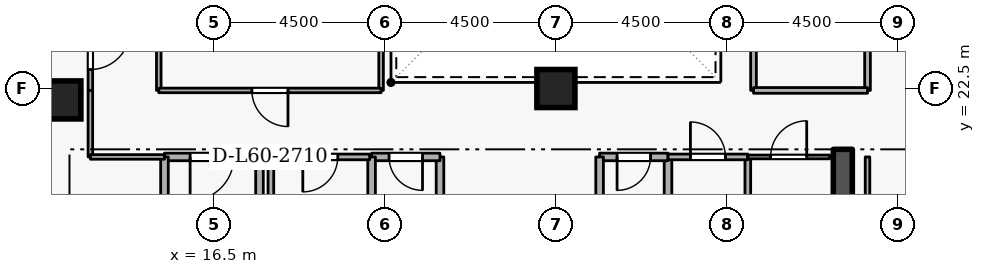
"""IFC4 building model, lengths in metres.
Left out: names, types, materials, properties, quantities, classifications, styles, units other than length and angle.
Written with IfcOpenShell. Run it as: python <this file> out.ifc"""

import sys

from ifc_helpers import new_model, si_unit, direction, frame, frame_2d, origin, origin_2d, place, context, subcontext, project, spatial, rectangle, extrude, element, fill, save


model = new_model("IFC4")
c1 = context("Model", 3, precision=1e-05, world=origin(), true_north=direction((0.0, 1.0)))
c2 = subcontext(c1, "Body", "Model", "MODEL_VIEW")
j1 = project(units=[si_unit("LENGTHUNIT", "METRE"), si_unit("PLANEANGLEUNIT", "RADIAN")], contexts=[c1])
p1 = place(None, origin())
s1 = spatial("IfcSite", under=j1, at=p1, CompositionType="ELEMENT")
p2 = place(p1, origin())
s2 = spatial("IfcBuilding", under=s1, at=p2, CompositionType="ELEMENT")
p3 = place(p2, frame((0.0, 0.0, 225.9)))
s3 = spatial("IfcBuildingStorey", under=s2, at=p3, CompositionType="ELEMENT", Elevation=225.9)
p4 = place(p3, frame((33.05, 15.1, 0.0), z_axis=(0.0, 0.0, 1.0), x_axis=(0.0, 1.0, 0.0)))
e1 = element("IfcWall", 1, at=p4, inside=s3, PredefinedType="SHEAR", context=c2, shape_type="SweptSolid", body=[
    extrude(rectangle(XDim=5.8, YDim=0.5, at=frame_2d((2.9, 0.0))), origin(), (0.0, 0.0, 1.0), 3.6),
])
for number, where, z_axis, x_axis in (
    (2, (12.5, 22.2, 0.0), (0.0, 0.0, 1.0), (1.0, 0.0, 0.0)),
    (3, (25.5, 22.5, 0.0), (0.0, 0.0, 1.0), (1.0, 0.0, 0.0)),
):
    element("IfcColumn", number, at=place(p3, frame(where, z_axis=z_axis, x_axis=x_axis)), inside=s3, PredefinedType="COLUMN", context=c2, shape_type="SweptSolid", body=[
        extrude(rectangle(XDim=1.0, YDim=1.0, at=origin_2d()), origin(), (0.0, 0.0, 1.0), 3.6),
    ])
p5 = place(p3, frame((17.7, 18.4, 0.0), z_axis=(0.0, 0.0, 1.0), x_axis=(0.0, 1.0, 0.0)))
e4 = element("IfcWall", 4, at=p5, inside=s3, PredefinedType="STANDARD", context=c2, shape_type="SweptSolid", body=[
    extrude(rectangle(XDim=2.3, YDim=0.2, at=frame_2d((1.15, 0.0))), origin(), (0.0, 0.0, 1.0), 2.505),
])
p6 = place(p3, frame((17.7, 20.7, 0.0), z_axis=(0.0, 0.0, 1.0), x_axis=(-1.0, 0.0, 0.0)))
e5 = element("IfcWall", 5, at=p6, inside=s3, PredefinedType="STANDARD", context=c2, shape_type="SweptSolid", body=[
    extrude(rectangle(XDim=2.5, YDim=0.2, at=frame_2d((1.25, 0.0))), origin(), (0.0, 0.0, 1.0), 3.3),
])
p7 = place(p6, frame((0.675, 0.0, 0.0)))
e6 = element("IfcOpeningElement", 6, at=p7, cuts=e5, PredefinedType="OPENING", context=c2, shape_type="SweptSolid", body=[
    extrude(rectangle(XDim=1.15, YDim=2.1, at=frame_2d((0.575, 1.05))), frame((0.0, 0.11, 0.0), z_axis=(0.0, -1.0, 0.0), x_axis=(1.0, 0.0, 0.0)), (0.0, 0.0, 1.0), 0.22),
])
p8 = place(p3, frame((15.2, 20.7, 0.0), z_axis=(0.0, 0.0, 1.0), x_axis=(0.0, -1.0, 0.0)))
e7 = element("IfcWall", 7, at=p8, inside=s3, PredefinedType="STANDARD", context=c2, shape_type="SweptSolid", body=[
    extrude(rectangle(XDim=5.7, YDim=0.2, at=frame_2d((2.85, 0.0))), origin(), (0.0, 0.0, 1.0), 3.3),
])
p9 = place(p3, frame((28.45, 18.65, 0.0), z_axis=(0.0, 0.0, 1.0), x_axis=(0.0, 1.0, 0.0)))
e8 = element("IfcWall", 8, at=p9, inside=s3, PredefinedType="STANDARD", context=c2, shape_type="SweptSolid", body=[
    extrude(rectangle(XDim=2.05, YDim=0.2, at=frame_2d((1.025, 0.0))), origin(), (0.0, 0.0, 1.0), 3.3),
])
p10 = place(p3, frame((28.45, 20.7, 0.0), z_axis=(0.0, 0.0, 1.0), x_axis=(-1.0, 0.0, 0.0)))
e9 = element("IfcWall", 9, at=p10, inside=s3, PredefinedType="STANDARD", context=c2, shape_type="SweptSolid", body=[
    extrude(rectangle(XDim=1.8, YDim=0.2, at=frame_2d((0.9, 0.0))), origin(), (0.0, 0.0, 1.0), 3.3),
])
p11 = place(p10, frame((0.46, 0.0, 0.0)))
e10 = element("IfcOpeningElement", 10, at=p11, cuts=e9, PredefinedType="OPENING", context=c2, shape_type="SweptSolid", body=[
    extrude(rectangle(XDim=0.88, YDim=2.04, at=frame_2d((0.44, 1.02))), frame((0.0, 0.11, 0.0), z_axis=(0.0, -1.0, 0.0), x_axis=(1.0, 0.0, 0.0)), (0.0, 0.0, 1.0), 0.22),
])
for number, where, z_axis, x_axis in (
    (11, (26.65, 20.7, 0.0), (0.0, 0.0, 1.0), (0.0, -1.0, 0.0)),
    (12, (22.45, 18.65, 0.0), (0.0, 0.0, 1.0), (0.0, 1.0, 0.0)),
):
    element("IfcWall", number, at=place(p3, frame(where, z_axis=z_axis, x_axis=x_axis)), inside=s3, PredefinedType="STANDARD", context=c2, shape_type="SweptSolid", body=[
        extrude(rectangle(XDim=2.05, YDim=0.2, at=frame_2d((1.025, 0.0))), origin(), (0.0, 0.0, 1.0), 3.3),
    ])
p12 = place(p3, frame((22.45, 20.7, 0.0), z_axis=(0.0, 0.0, 1.0), x_axis=(-1.0, 0.0, 0.0)))
e13 = element("IfcWall", 13, at=p12, inside=s3, PredefinedType="STANDARD", context=c2, shape_type="SweptSolid", body=[
    extrude(rectangle(XDim=1.8, YDim=0.2, at=frame_2d((0.9, 0.0))), origin(), (0.0, 0.0, 1.0), 3.3),
])
p13 = place(p12, frame((0.46, 0.0, 0.0)))
e14 = element("IfcOpeningElement", 14, at=p13, cuts=e13, PredefinedType="OPENING", context=c2, shape_type="SweptSolid", body=[
    extrude(rectangle(XDim=0.88, YDim=2.04, at=frame_2d((0.44, 1.02))), frame((0.0, 0.11, 0.0), z_axis=(0.0, -1.0, 0.0), x_axis=(1.0, 0.0, 0.0)), (0.0, 0.0, 1.0), 0.22),
])
p14 = place(p3, frame((20.65, 20.7, 0.0), z_axis=(0.0, 0.0, 1.0), x_axis=(0.0, -1.0, 0.0)))
e15 = element("IfcWall", 15, at=p14, inside=s3, PredefinedType="STANDARD", context=c2, shape_type="SweptSolid", body=[
    extrude(rectangle(XDim=2.05, YDim=0.2, at=frame_2d((1.025, 0.0))), origin(), (0.0, 0.0, 1.0), 3.3),
])
p15 = place(p3, frame((20.6, 20.7, 0.0), z_axis=(0.0, 0.0, 1.0), x_axis=(-1.0, 0.0, 0.0)))
e16 = element("IfcWall", 16, at=p15, inside=s3, PredefinedType="PARTITIONING", context=c2, shape_type="SweptSolid", body=[
    extrude(rectangle(XDim=2.6, YDim=0.15, at=frame_2d((1.3, 0.0))), origin(), (0.0, 0.0, 1.0), 3.3),
])
p16 = place(p15, frame((0.84, 0.0, 0.0)))
e17 = element("IfcOpeningElement", 17, at=p16, cuts=e16, PredefinedType="OPENING", context=c2, shape_type="SweptSolid", body=[
    extrude(rectangle(XDim=0.92, YDim=2.08, at=frame_2d((0.46, 1.04))), frame((0.0, 0.085, 0.0), z_axis=(0.0, -1.0, 0.0), x_axis=(1.0, 0.0, 0.0)), (0.0, 0.0, 1.0), 0.17),
])
p17 = place(p3, frame((18.0, 20.7, 0.0), z_axis=(0.0, 0.0, 1.0), x_axis=(0.0, -1.0, 0.0)))
e18 = element("IfcWall", 18, at=p17, inside=s3, PredefinedType="PARTITIONING", context=c2, shape_type="SweptSolid", body=[
    extrude(rectangle(XDim=2.05, YDim=0.15, at=frame_2d((1.025, 0.0))), origin(), (0.0, 0.0, 1.0), 2.505),
])
p18 = place(p3, frame((30.55, 20.7, 0.0), z_axis=(0.0, 0.0, 1.0), x_axis=(0.0, -1.0, 0.0)))
e19 = element("IfcWall", 19, at=p18, inside=s3, PredefinedType="PARTITIONING", context=c2, shape_type="SweptSolid", body=[
    extrude(rectangle(XDim=2.05, YDim=0.15, at=frame_2d((1.025, 0.0))), origin(), (0.0, 0.0, 1.0), 3.3),
])
p19 = place(p3, frame((28.45, 20.7, 0.0), z_axis=(0.0, 0.0, 1.0), x_axis=(1.0, 0.0, 0.0)))
e20 = element("IfcWall", 20, at=p19, inside=s3, PredefinedType="PARTITIONING", context=c2, shape_type="SweptSolid", body=[
    extrude(rectangle(XDim=2.1, YDim=0.15, at=frame_2d((1.05, 0.0))), origin(), (0.0, 0.0, 1.0), 3.3),
])
p20 = place(p19, frame((0.59, 0.0, 0.0)))
e21 = element("IfcOpeningElement", 21, at=p20, cuts=e20, PredefinedType="OPENING", context=c2, shape_type="SweptSolid", body=[
    extrude(rectangle(XDim=0.92, YDim=2.08, at=frame_2d((0.46, 1.04))), frame((0.0, 0.085, 0.0), z_axis=(0.0, -1.0, 0.0), x_axis=(1.0, 0.0, 0.0)), (0.0, 0.0, 1.0), 0.17),
])
p21 = place(p3, frame((30.55, 20.7, 0.0), z_axis=(0.0, 0.0, 1.0), x_axis=(1.0, 0.0, 0.0)))
e22 = element("IfcWall", 22, at=p21, inside=s3, PredefinedType="PARTITIONING", context=c2, shape_type="SweptSolid", body=[
    extrude(rectangle(XDim=2.15, YDim=0.1, at=frame_2d((1.075, 0.0))), origin(), (0.0, 0.0, 1.0), 3.3),
])
p22 = place(p21, frame((0.6, 0.0, 0.0)))
e23 = element("IfcOpeningElement", 23, at=p22, cuts=e22, PredefinedType="OPENING", context=c2, shape_type="SweptSolid", body=[
    extrude(rectangle(XDim=0.95, YDim=2.1, at=frame_2d((0.475, 1.05))), frame((0.0, 0.06, 0.0), z_axis=(0.0, -1.0, 0.0), x_axis=(1.0, 0.0, 0.0)), (0.0, 0.0, 1.0), 0.12),
])
p23 = place(p3, frame((33.7, 20.7, 0.0), z_axis=(0.0, 0.0, 1.0), x_axis=(0.0, -1.0, 0.0)))
e24 = element("IfcWall", 24, at=p23, inside=s3, PredefinedType="PARTITIONING", context=c2, shape_type="SweptSolid", body=[
    extrude(rectangle(XDim=5.9, YDim=0.12, at=frame_2d((2.95, 0.0))), origin(), (0.0, 0.0, 1.0), 3.3),
])
p24 = place(p3, frame((13.25, 24.6, 0.0), z_axis=(0.0, 0.0, 1.0), x_axis=(0.0, -1.0, 0.0)))
e25 = element("IfcWall", 25, at=p24, inside=s3, PredefinedType="PARTITIONING", context=c2, shape_type="SweptSolid", body=[
    extrude(rectangle(XDim=2.15, YDim=0.12, at=frame_2d((1.075, 0.0))), origin(), (0.0, 0.0, 1.0), 3.3),
])
p25 = place(p24, frame((0.55, 0.0, 0.0)))
e26 = element("IfcOpeningElement", 26, at=p25, cuts=e25, PredefinedType="OPENING", context=c2, shape_type="SweptSolid", body=[
    extrude(rectangle(XDim=1.05, YDim=2.1, at=frame_2d((0.525, 1.05))), frame((0.0, 0.07, 0.0), z_axis=(0.0, -1.0, 0.0), x_axis=(1.0, 0.0, 0.0)), (0.0, 0.0, 1.0), 0.14),
])
p26 = place(p3, frame((13.25, 22.45, 0.0), z_axis=(0.0, 0.0, 1.0), x_axis=(0.0, -1.0, 0.0)))
e27 = element("IfcWall", 27, at=p26, inside=s3, PredefinedType="PARTITIONING", context=c2, shape_type="SweptSolid", body=[
    extrude(rectangle(XDim=1.75, YDim=0.12, at=frame_2d((0.875, 0.0))), origin(), (0.0, 0.0, 1.0), 3.3),
])
p27 = place(p3, frame((13.25, 20.7, 0.0), z_axis=(0.0, 0.0, 1.0), x_axis=(1.0, 0.0, 0.0)))
e28 = element("IfcWall", 28, at=p27, inside=s3, PredefinedType="PARTITIONING", context=c2, shape_type="SweptSolid", body=[
    extrude(rectangle(XDim=1.95, YDim=0.12, at=frame_2d((0.975, 0.0))), origin(), (0.0, 0.0, 1.0), 3.3),
])
for number, where, z_axis, x_axis in (
    (29, (15.05, 22.45, 0.0), (0.0, 0.0, 1.0), (0.0, 1.0, 0.0)),
    (30, (20.9, 26.2, 0.0), (0.0, 0.0, 1.0), (0.0, -1.0, 0.0)),
):
    element("IfcWall", number, at=place(p3, frame(where, z_axis=z_axis, x_axis=x_axis)), inside=s3, PredefinedType="PARTITIONING", context=c2, shape_type="SweptSolid", body=[
        extrude(rectangle(XDim=3.75, YDim=0.12, at=frame_2d((1.875, 0.0))), origin(), (0.0, 0.0, 1.0), 3.3),
    ])
p28 = place(p3, frame((20.9, 22.45, 0.0), z_axis=(0.0, 0.0, 1.0), x_axis=(-1.0, 0.0, 0.0)))
e31 = element("IfcWall", 31, at=p28, inside=s3, PredefinedType="PARTITIONING", context=c2, shape_type="SweptSolid", body=[
    extrude(rectangle(XDim=5.85, YDim=0.12, at=frame_2d((2.925, 0.0))), origin(), (0.0, 0.0, 1.0), 3.3),
])
p29 = place(p28, frame((2.45, 0.0, 0.0)))
e32 = element("IfcOpeningElement", 32, at=p29, cuts=e31, PredefinedType="OPENING", context=c2, shape_type="SweptSolid", body=[
    extrude(rectangle(XDim=0.95, YDim=2.1, at=frame_2d((0.475, 1.05))), frame((0.0, 0.07, 0.0), z_axis=(0.0, -1.0, 0.0), x_axis=(1.0, 0.0, 0.0)), (0.0, 0.0, 1.0), 0.14),
])
p30 = place(p3, frame((30.7, 22.45, 0.0), z_axis=(0.0, 0.0, 1.0), x_axis=(0.0, 1.0, 0.0)))
e33 = element("IfcWall", 33, at=p30, inside=s3, PredefinedType="PARTITIONING", context=c2, shape_type="SweptSolid", body=[
    extrude(rectangle(XDim=4.0, YDim=0.15, at=frame_2d((2.0, 0.0))), origin(), (0.0, 0.0, 1.0), 3.3),
])
p31 = place(p3, frame((33.7, 26.45, 0.0), z_axis=(0.0, 0.0, 1.0), x_axis=(0.0, -1.0, 0.0)))
e34 = element("IfcWall", 34, at=p31, inside=s3, PredefinedType="PARTITIONING", context=c2, shape_type="SweptSolid", body=[
    extrude(rectangle(XDim=4.0, YDim=0.15, at=frame_2d((2.0, 0.0))), origin(), (0.0, 0.0, 1.0), 3.3),
])
p32 = place(p31, frame((1.35, 0.0, 0.0)))
e35 = element("IfcOpeningElement", 35, at=p32, cuts=e34, PredefinedType="OPENING", context=c2, shape_type="SweptSolid", body=[
    extrude(rectangle(XDim=1.3, YDim=2.12, at=frame_2d((0.65, 1.06))), frame((0.0, 0.085, 0.0), z_axis=(0.0, -1.0, 0.0), x_axis=(1.0, 0.0, 0.0)), (0.0, 0.0, 1.0), 0.17),
])
p33 = place(p3, frame((33.7, 22.45, 0.0), z_axis=(0.0, 0.0, 1.0), x_axis=(-1.0, 0.0, 0.0)))
e36 = element("IfcWall", 36, at=p33, inside=s3, PredefinedType="PARTITIONING", context=c2, shape_type="SweptSolid", body=[
    extrude(rectangle(XDim=3.0, YDim=0.15, at=frame_2d((1.5, 0.0))), origin(), (0.0, 0.0, 1.0), 3.3),
])
p34 = place(p7, origin())
e37 = element("IfcDoor", 37, at=p34, inside=s3, OperationType="SINGLE_SWING_RIGHT", PredefinedType="DOOR", context=c2, shape_type="SweptSolid", body=[
    extrude(rectangle(XDim=1.15, YDim=2.1, at=frame_2d((0.575, 1.05))), frame((0.0, 0.025, 0.0), z_axis=(0.0, -1.0, 0.0), x_axis=(1.0, 0.0, 0.0)), (0.0, 0.0, 1.0), 0.05),
])
fill(e6, e37)
p35 = place(p11, origin())
e38 = element("IfcDoor", 38, at=p35, inside=s3, OperationType="SINGLE_SWING_RIGHT", PredefinedType="DOOR", context=c2, shape_type="SweptSolid", body=[
    extrude(rectangle(XDim=0.88, YDim=2.04, at=frame_2d((0.44, 1.02))), frame((0.0, 0.025, 0.0), z_axis=(0.0, -1.0, 0.0), x_axis=(1.0, 0.0, 0.0)), (0.0, 0.0, 1.0), 0.05),
])
fill(e10, e38)
p36 = place(p13, origin())
e39 = element("IfcDoor", 39, at=p36, inside=s3, OperationType="SINGLE_SWING_LEFT", PredefinedType="DOOR", context=c2, shape_type="SweptSolid", body=[
    extrude(rectangle(XDim=0.88, YDim=2.04, at=frame_2d((0.44, 1.02))), frame((0.0, 0.025, 0.0), z_axis=(0.0, -1.0, 0.0), x_axis=(1.0, 0.0, 0.0)), (0.0, 0.0, 1.0), 0.05),
])
fill(e14, e39)
p37 = place(p16, origin())
e40 = element("IfcDoor", 40, at=p37, inside=s3, OperationType="SINGLE_SWING_RIGHT", PredefinedType="DOOR", context=c2, shape_type="SweptSolid", body=[
    extrude(rectangle(XDim=0.92, YDim=2.08, at=frame_2d((0.46, 1.04))), frame((0.0, 0.025, 0.0), z_axis=(0.0, -1.0, 0.0), x_axis=(1.0, 0.0, 0.0)), (0.0, 0.0, 1.0), 0.05),
])
fill(e17, e40)
p38 = place(p20, origin())
e41 = element("IfcDoor", 41, at=p38, inside=s3, OperationType="SINGLE_SWING_LEFT", PredefinedType="DOOR", context=c2, shape_type="SweptSolid", body=[
    extrude(rectangle(XDim=0.92, YDim=2.08, at=frame_2d((0.46, 1.04))), frame((0.0, 0.025, 0.0), z_axis=(0.0, -1.0, 0.0), x_axis=(1.0, 0.0, 0.0)), (0.0, 0.0, 1.0), 0.05),
])
fill(e21, e41)
p39 = place(p22, origin())
e42 = element("IfcDoor", 42, at=p39, inside=s3, OperationType="SINGLE_SWING_RIGHT", PredefinedType="DOOR", context=c2, shape_type="SweptSolid", body=[
    extrude(rectangle(XDim=0.95, YDim=2.1, at=frame_2d((0.475, 1.05))), frame((0.0, 0.025, 0.0), z_axis=(0.0, -1.0, 0.0), x_axis=(1.0, 0.0, 0.0)), (0.0, 0.0, 1.0), 0.05),
])
fill(e23, e42)
p40 = place(p25, origin())
e43 = element("IfcDoor", 43, at=p40, inside=s3, OperationType="SINGLE_SWING_LEFT", PredefinedType="DOOR", context=c2, shape_type="SweptSolid", body=[
    extrude(rectangle(XDim=1.05, YDim=2.1, at=frame_2d((0.525, 1.05))), frame((0.0, 0.025, 0.0), z_axis=(0.0, -1.0, 0.0), x_axis=(1.0, 0.0, 0.0)), (0.0, 0.0, 1.0), 0.05),
])
fill(e26, e43)
p41 = place(p29, origin())
e44 = element("IfcDoor", 44, at=p41, inside=s3, OperationType="SINGLE_SWING_LEFT", PredefinedType="DOOR", context=c2, shape_type="SweptSolid", body=[
    extrude(rectangle(XDim=0.95, YDim=2.1, at=frame_2d((0.475, 1.05))), frame((0.0, 0.025, 0.0), z_axis=(0.0, -1.0, 0.0), x_axis=(1.0, 0.0, 0.0)), (0.0, 0.0, 1.0), 0.05),
])
fill(e32, e44)
save(model, sys.argv[1])
